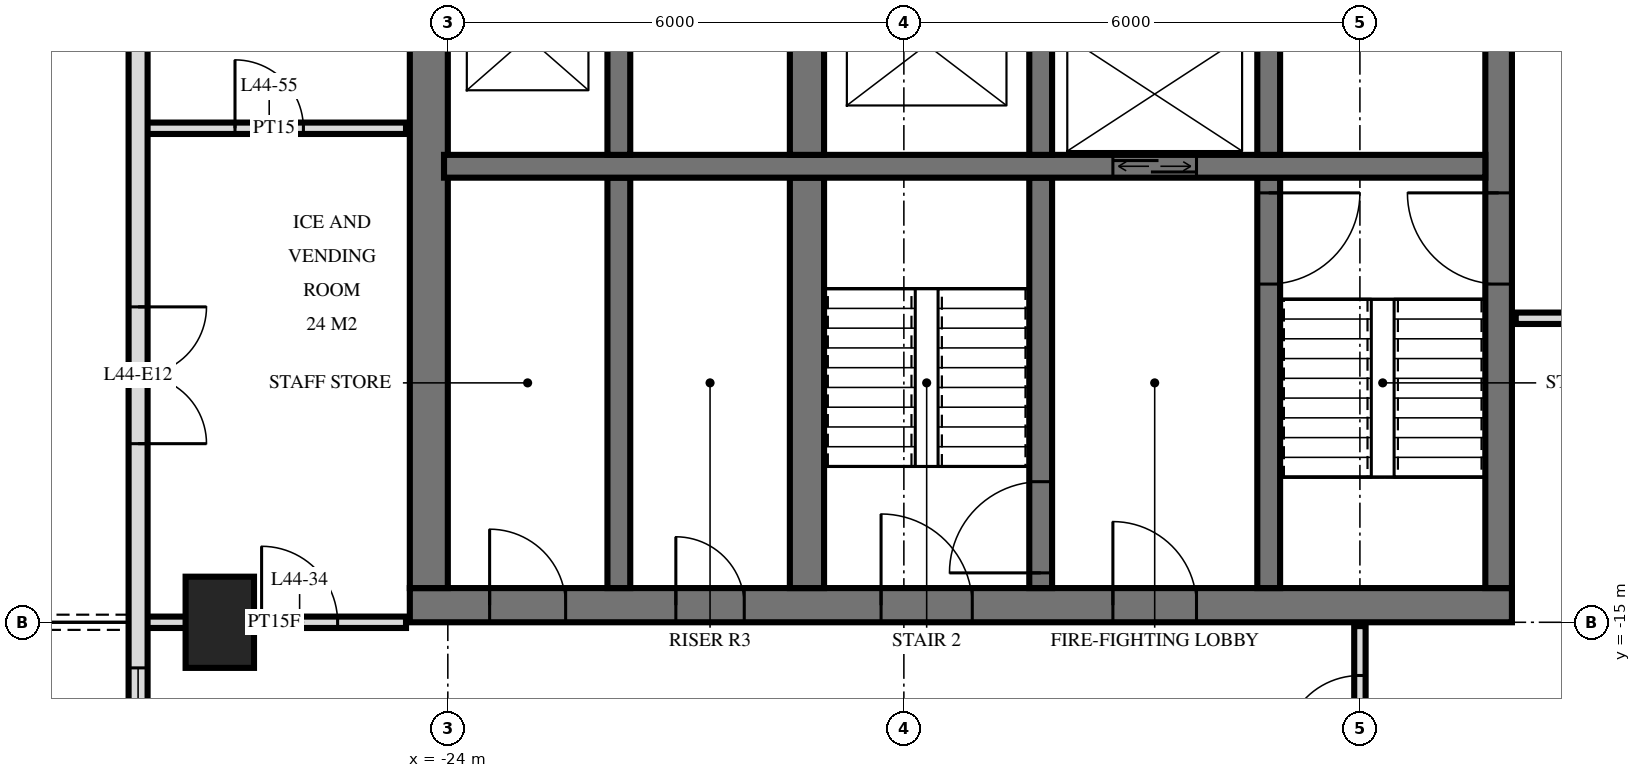
"""IFC4 building model, lengths in metres.
Left out: names, types, materials, properties, quantities, classifications, styles, units other than length and angle.
Written with IfcOpenShell. Run it as: python <this file> out.ifc"""

import sys

from ifc_helpers import new_model, si_unit, direction, frame, frame_2d, origin, origin_2d, place, context, subcontext, project, spatial, rectangle, extrude, element, fill, save


model = new_model("IFC4")
c1 = context("Model", 3, precision=1e-05, world=origin(), true_north=direction((0.0, 1.0)))
c2 = subcontext(c1, "Body", "Model", "MODEL_VIEW")
j1 = project(units=[si_unit("LENGTHUNIT", "METRE"), si_unit("PLANEANGLEUNIT", "RADIAN")], contexts=[c1])
p1 = place(None, origin())
s1 = spatial("IfcSite", under=j1, at=p1, CompositionType="ELEMENT")
p2 = place(p1, origin())
s2 = spatial("IfcBuilding", under=s1, at=p2, CompositionType="ELEMENT")
p3 = place(p2, frame((0.0, 0.0, 170.4)))
s3 = spatial("IfcBuildingStorey", under=s2, at=p3, CompositionType="ELEMENT", Elevation=170.4)
p4 = place(p3, frame((-27.0, -15.0, 0.0), z_axis=(0.0, 0.0, 1.0), x_axis=(0.0, 1.0, 0.0)))
e1 = element("IfcColumn", 1, at=p4, inside=s3, PredefinedType="COLUMN", context=c2, shape_type="SweptSolid", body=[
    extrude(rectangle(XDim=1.2, YDim=0.9, at=origin_2d()), origin(), (0.0, 0.0, 1.0), 3.6),
])
p5 = place(p3, frame((-24.5, -14.775, 0.0), z_axis=(0.0, 0.0, 1.0), x_axis=(1.0, 0.0, 0.0)))
e2 = element("IfcWall", 2, at=p5, inside=s3, PredefinedType="SHEAR", context=c2, shape_type="SweptSolid", body=[
    extrude(rectangle(XDim=14.5, YDim=0.45, at=frame_2d((7.25, 0.0))), origin(), (0.0, 0.0, 1.0), 3.6),
])
p6 = place(p5, frame((6.2, 0.0, 0.0)))
e3 = element("IfcOpeningElement", 3, at=p6, cuts=e2, PredefinedType="OPENING", context=c2, shape_type="SweptSolid", body=[
    extrude(rectangle(XDim=1.2, YDim=2.1, at=frame_2d((0.6, 1.05))), frame((0.0, 0.235, 0.0), z_axis=(0.0, -1.0, 0.0), x_axis=(1.0, 0.0, 0.0)), (0.0, 0.0, 1.0), 0.47),
])
p7 = place(p5, frame((9.25, 0.0, 0.0)))
e4 = element("IfcOpeningElement", 4, at=p7, cuts=e2, PredefinedType="OPENING", context=c2, shape_type="SweptSolid", body=[
    extrude(rectangle(XDim=1.1, YDim=2.1, at=frame_2d((0.55, 1.05))), frame((0.0, 0.235, 0.0), z_axis=(0.0, -1.0, 0.0), x_axis=(1.0, 0.0, 0.0)), (0.0, 0.0, 1.0), 0.47),
])
p8 = place(p5, frame((3.5, 0.0, 0.0)))
e5 = element("IfcOpeningElement", 5, at=p8, cuts=e2, PredefinedType="OPENING", context=c2, shape_type="SweptSolid", body=[
    extrude(rectangle(XDim=0.9, YDim=2.1, at=frame_2d((0.45, 1.05))), frame((0.0, 0.235, 0.0), z_axis=(0.0, -1.0, 0.0), x_axis=(1.0, 0.0, 0.0)), (0.0, 0.0, 1.0), 0.47),
])
p9 = place(p5, frame((1.05, 0.0, 0.0)))
e6 = element("IfcOpeningElement", 6, at=p9, cuts=e2, PredefinedType="OPENING", context=c2, shape_type="SweptSolid", body=[
    extrude(rectangle(XDim=1.0, YDim=2.1, at=frame_2d((0.5, 1.05))), frame((0.0, 0.235, 0.0), z_axis=(0.0, -1.0, 0.0), x_axis=(1.0, 0.0, 0.0)), (0.0, 0.0, 1.0), 0.47),
])
p10 = place(p3, frame((-10.175, -14.55, 0.0), z_axis=(0.0, 0.0, 1.0), x_axis=(0.0, 1.0, 0.0)))
e7 = element("IfcWall", 7, at=p10, inside=s3, PredefinedType="SHEAR", context=c2, shape_type="SweptSolid", body=[
    extrude(rectangle(XDim=14.1, YDim=0.35, at=frame_2d((7.05, 0.0))), origin(), (0.0, 0.0, 1.0), 3.6),
])
p11 = place(p10, frame((8.4, 0.0, 0.0)))
e8 = element("IfcOpeningElement", 8, at=p11, cuts=e7, PredefinedType="OPENING", context=c2, shape_type="SweptSolid", body=[
    extrude(rectangle(XDim=1.4, YDim=2.4, at=frame_2d((0.7, 1.2))), frame((0.0, 0.185, 0.0), z_axis=(0.0, -1.0, 0.0), x_axis=(1.0, 0.0, 0.0)), (0.0, 0.0, 1.0), 0.37),
])
p12 = place(p10, frame((10.0, 0.0, 0.0)))
e9 = element("IfcOpeningElement", 9, at=p12, cuts=e7, PredefinedType="OPENING", context=c2, shape_type="SweptSolid", body=[
    extrude(rectangle(XDim=1.4, YDim=2.4, at=frame_2d((0.7, 1.2))), frame((0.0, 0.185, 0.0), z_axis=(0.0, -1.0, 0.0), x_axis=(1.0, 0.0, 0.0)), (0.0, 0.0, 1.0), 0.37),
])
p13 = place(p10, frame((4.0, 0.0, 0.0)))
e10 = element("IfcOpeningElement", 10, at=p13, cuts=e7, PredefinedType="OPENING", context=c2, shape_type="SweptSolid", body=[
    extrude(rectangle(XDim=1.2, YDim=2.1, at=frame_2d((0.6, 1.05))), frame((0.0, 0.185, 0.0), z_axis=(0.0, -1.0, 0.0), x_axis=(1.0, 0.0, 0.0)), (0.0, 0.0, 1.0), 0.37),
])
p14 = place(p3, frame((-24.25, -14.55, 0.0), z_axis=(0.0, 0.0, 1.0), x_axis=(0.0, 1.0, 0.0)))
e11 = element("IfcWall", 11, at=p14, inside=s3, PredefinedType="SHEAR", context=c2, shape_type="SweptSolid", body=[
    extrude(rectangle(XDim=14.1, YDim=0.5, at=frame_2d((7.05, 0.0))), origin(), (0.0, 0.0, 1.0), 3.6),
])
p15 = place(p3, frame((-24.05, -9.0, 0.0), z_axis=(0.0, 0.0, 1.0), x_axis=(1.0, 0.0, 0.0)))
e12 = element("IfcWall", 12, at=p15, inside=s3, PredefinedType="SHEAR", context=c2, shape_type="SweptSolid", body=[
    extrude(rectangle(XDim=13.7, YDim=0.3, at=frame_2d((6.85, 0.0))), origin(), (0.0, 0.0, 1.0), 3.6),
])
p16 = place(p15, frame((8.8, 0.0, 0.0)))
e13 = element("IfcOpeningElement", 13, at=p16, cuts=e12, PredefinedType="OPENING", context=c2, shape_type="SweptSolid", body=[
    extrude(rectangle(XDim=1.1, YDim=2.1, at=frame_2d((0.55, 1.05))), frame((0.0, 0.16, 0.0), z_axis=(0.0, -1.0, 0.0), x_axis=(1.0, 0.0, 0.0)), (0.0, 0.0, 1.0), 0.32),
])
p17 = place(p3, frame((-13.2, -8.85, 0.0), z_axis=(0.0, 0.0, 1.0), x_axis=(0.0, 1.0, 0.0)))
e14 = element("IfcWall", 14, at=p17, inside=s3, PredefinedType="SHEAR", context=c2, shape_type="SweptSolid", body=[
    extrude(rectangle(XDim=2.3, YDim=0.3, at=frame_2d((1.15, 0.0))), origin(), (0.0, 0.0, 1.0), 3.6),
])
p18 = place(p3, frame((-13.2, -14.55, 0.0), z_axis=(0.0, 0.0, 1.0), x_axis=(0.0, 1.0, 0.0)))
e15 = element("IfcWall", 15, at=p18, inside=s3, PredefinedType="SHEAR", context=c2, shape_type="SweptSolid", body=[
    extrude(rectangle(XDim=5.4, YDim=0.3, at=frame_2d((2.7, 0.0))), origin(), (0.0, 0.0, 1.0), 3.6),
])
p19 = place(p18, frame((4.0, 0.0, 0.0)))
e16 = element("IfcOpeningElement", 16, at=p19, cuts=e15, PredefinedType="OPENING", context=c2, shape_type="SweptSolid", body=[
    extrude(rectangle(XDim=1.2, YDim=2.1, at=frame_2d((0.6, 1.05))), frame((0.0, 0.16, 0.0), z_axis=(0.0, -1.0, 0.0), x_axis=(1.0, 0.0, 0.0)), (0.0, 0.0, 1.0), 0.32),
])
p20 = place(p3, frame((-16.2, -8.85, 0.0), z_axis=(0.0, 0.0, 1.0), x_axis=(0.0, 1.0, 0.0)))
e17 = element("IfcWall", 17, at=p20, inside=s3, PredefinedType="SHEAR", context=c2, shape_type="SweptSolid", body=[
    extrude(rectangle(XDim=2.3, YDim=0.3, at=frame_2d((1.15, 0.0))), origin(), (0.0, 0.0, 1.0), 3.6),
])
p21 = place(p3, frame((-16.2, -14.55, 0.0), z_axis=(0.0, 0.0, 1.0), x_axis=(0.0, 1.0, 0.0)))
e18 = element("IfcWall", 18, at=p21, inside=s3, PredefinedType="SHEAR", context=c2, shape_type="SweptSolid", body=[
    extrude(rectangle(XDim=5.4, YDim=0.3, at=frame_2d((2.7, 0.0))), origin(), (0.0, 0.0, 1.0), 3.6),
])
p22 = place(p21, frame((0.2, 0.0, 0.0)))
e19 = element("IfcOpeningElement", 19, at=p22, cuts=e18, PredefinedType="OPENING", context=c2, shape_type="SweptSolid", body=[
    extrude(rectangle(XDim=1.2, YDim=2.1, at=frame_2d((0.6, 1.05))), frame((0.0, 0.16, 0.0), z_axis=(0.0, -1.0, 0.0), x_axis=(1.0, 0.0, 0.0)), (0.0, 0.0, 1.0), 0.32),
])
p23 = place(p3, frame((-19.275, -8.85, 0.0), z_axis=(0.0, 0.0, 1.0), x_axis=(0.0, 1.0, 0.0)))
e20 = element("IfcWall", 20, at=p23, inside=s3, PredefinedType="SHEAR", context=c2, shape_type="SweptSolid", body=[
    extrude(rectangle(XDim=2.3, YDim=0.45, at=frame_2d((1.15, 0.0))), origin(), (0.0, 0.0, 1.0), 3.6),
])
p24 = place(p3, frame((-19.275, -14.55, 0.0), z_axis=(0.0, 0.0, 1.0), x_axis=(0.0, 1.0, 0.0)))
e21 = element("IfcWall", 21, at=p24, inside=s3, PredefinedType="SHEAR", context=c2, shape_type="SweptSolid", body=[
    extrude(rectangle(XDim=5.4, YDim=0.45, at=frame_2d((2.7, 0.0))), origin(), (0.0, 0.0, 1.0), 3.6),
])
p25 = place(p3, frame((-21.75, -8.85, 0.0), z_axis=(0.0, 0.0, 1.0), x_axis=(0.0, 1.0, 0.0)))
e22 = element("IfcWall", 22, at=p25, inside=s3, PredefinedType="SHEAR", context=c2, shape_type="SweptSolid", body=[
    extrude(rectangle(XDim=2.3, YDim=0.3, at=frame_2d((1.15, 0.0))), origin(), (0.0, 0.0, 1.0), 3.6),
])
p26 = place(p3, frame((-21.75, -14.55, 0.0), z_axis=(0.0, 0.0, 1.0), x_axis=(0.0, 1.0, 0.0)))
e23 = element("IfcWall", 23, at=p26, inside=s3, PredefinedType="SHEAR", context=c2, shape_type="SweptSolid", body=[
    extrude(rectangle(XDim=5.4, YDim=0.3, at=frame_2d((2.7, 0.0))), origin(), (0.0, 0.0, 1.0), 3.6),
])
p27 = place(p3, frame((-28.075, -3.325, 0.0), z_axis=(0.0, 0.0, 1.0), x_axis=(0.0, -1.0, 0.0)))
e24 = element("IfcWall", 24, at=p27, inside=s3, PredefinedType="SOLIDWALL", context=c2, shape_type="SweptSolid", body=[
    extrude(rectangle(XDim=25.951, YDim=0.25, at=frame_2d((12.975, 0.0))), origin(), (0.0, 0.0, 1.0), 3.32),
])
p28 = place(p27, frame((7.525, 0.0, 0.0)))
e25 = element("IfcOpeningElement", 25, at=p28, cuts=e24, PredefinedType="OPENING", context=c2, shape_type="SweptSolid", body=[
    extrude(rectangle(XDim=1.8, YDim=2.4, at=frame_2d((0.9, 1.2))), frame((0.0, 0.135, 0.0), z_axis=(0.0, -1.0, 0.0), x_axis=(1.0, 0.0, 0.0)), (0.0, 0.0, 1.0), 0.27),
])
p29 = place(p27, frame((12.275, 0.0, 0.3)))
e26 = element("IfcOpeningElement", 26, at=p29, cuts=e24, PredefinedType="OPENING", context=c2, shape_type="SweptSolid", body=[
    extrude(rectangle(XDim=1.2, YDim=2.1, at=frame_2d((0.6, 1.05))), frame((0.0, 0.135, 0.0), z_axis=(0.0, -1.0, 0.0), x_axis=(1.0, 0.0, 0.0)), (0.0, 0.0, 1.0), 0.27),
])
p30 = place(p27, frame((14.975, 0.0, 0.3)))
e27 = element("IfcOpeningElement", 27, at=p30, cuts=e24, PredefinedType="OPENING", context=c2, shape_type="SweptSolid", body=[
    extrude(rectangle(XDim=2.4, YDim=2.1, at=frame_2d((1.2, 1.05))), frame((0.0, 0.135, 0.0), z_axis=(0.0, -1.0, 0.0), x_axis=(1.0, 0.0, 0.0)), (0.0, 0.0, 1.0), 0.27),
])
p31 = place(p27, frame((18.175, 0.0, 0.0)))
e28 = element("IfcOpeningElement", 28, at=p31, cuts=e24, PredefinedType="OPENING", context=c2, shape_type="SweptSolid", body=[
    extrude(rectangle(XDim=1.8, YDim=2.4, at=frame_2d((0.9, 1.2))), frame((0.0, 0.135, 0.0), z_axis=(0.0, -1.0, 0.0), x_axis=(1.0, 0.0, 0.0)), (0.0, 0.0, 1.0), 0.27),
])
p32 = place(p27, frame((21.075, 0.0, 0.0)))
e29 = element("IfcOpeningElement", 29, at=p32, cuts=e24, PredefinedType="OPENING", context=c2, shape_type="SweptSolid", body=[
    extrude(rectangle(XDim=1.8, YDim=2.4, at=frame_2d((0.9, 1.2))), frame((0.0, 0.135, 0.0), z_axis=(0.0, -1.0, 0.0), x_axis=(1.0, 0.0, 0.0)), (0.0, 0.0, 1.0), 0.27),
])
p33 = place(p27, frame((23.825, 0.0, 0.3)))
e30 = element("IfcOpeningElement", 30, at=p33, cuts=e24, PredefinedType="OPENING", context=c2, shape_type="SweptSolid", body=[
    extrude(rectangle(XDim=1.8, YDim=2.1, at=frame_2d((0.9, 1.05))), frame((0.0, 0.135, 0.0), z_axis=(0.0, -1.0, 0.0), x_axis=(1.0, 0.0, 0.0)), (0.0, 0.0, 1.0), 0.27),
])
p34 = place(p3, frame((-12.0, -17.4, 0.0), z_axis=(0.0, 0.0, 1.0), x_axis=(0.0, 1.0, 0.0)))
e31 = element("IfcWall", 31, at=p34, inside=s3, PredefinedType="PARTITIONING", context=c2, shape_type="SweptSolid", body=[
    extrude(rectangle(XDim=2.35, YDim=0.15, at=frame_2d((1.175, 0.0))), origin(), (0.0, 0.0, 1.0), 3.32),
])
p35 = place(p34, frame((0.7, 0.0, 0.0)))
e32 = element("IfcOpeningElement", 32, at=p35, cuts=e31, PredefinedType="OPENING", context=c2, shape_type="SweptSolid", body=[
    extrude(rectangle(XDim=1.0, YDim=2.1, at=frame_2d((0.5, 1.05))), frame((0.0, 0.085, 0.0), z_axis=(0.0, -1.0, 0.0), x_axis=(1.0, 0.0, 0.0)), (0.0, 0.0, 1.0), 0.17),
])
p36 = place(p3, frame((-28.02, -15.0, 0.0), z_axis=(0.0, 0.0, 1.0), x_axis=(1.0, 0.0, 0.0)))
e33 = element("IfcWall", 33, at=p36, inside=s3, PredefinedType="PARTITIONING", context=c2, shape_type="SweptSolid", body=[
    extrude(rectangle(XDim=3.47, YDim=0.15, at=frame_2d((1.735, 0.0))), origin(), (0.0, 0.0, 1.0), 3.32),
])
p37 = place(p36, frame((1.57, 0.0, 0.0)))
e34 = element("IfcOpeningElement", 34, at=p37, cuts=e33, PredefinedType="OPENING", context=c2, shape_type="SweptSolid", body=[
    extrude(rectangle(XDim=1.0, YDim=2.1, at=frame_2d((0.5, 1.05))), frame((0.0, 0.085, 0.0), z_axis=(0.0, -1.0, 0.0), x_axis=(1.0, 0.0, 0.0)), (0.0, 0.0, 1.0), 0.17),
])
p38 = place(p3, frame((-9.95, -11.0, 0.0), z_axis=(0.0, 0.0, 1.0), x_axis=(1.0, 0.0, 0.0)))
e35 = element("IfcWall", 35, at=p38, inside=s3, PredefinedType="PARTITIONING", context=c2, shape_type="SweptSolid", body=[
    extrude(rectangle(XDim=19.9, YDim=0.15, at=frame_2d((9.95, 0.0))), origin(), (0.0, 0.0, 1.0), 3.32),
])
p39 = place(p38, frame((9.45, 0.0, 0.0)))
e36 = element("IfcOpeningElement", 36, at=p39, cuts=e35, PredefinedType="OPENING", context=c2, shape_type="SweptSolid", body=[
    extrude(rectangle(XDim=1.0, YDim=2.1, at=frame_2d((0.5, 1.05))), frame((0.0, 0.085, 0.0), z_axis=(0.0, -1.0, 0.0), x_axis=(1.0, 0.0, 0.0)), (0.0, 0.0, 1.0), 0.17),
])
p40 = place(p38, frame((3.45, 0.0, 0.0)))
e37 = element("IfcOpeningElement", 37, at=p40, cuts=e35, PredefinedType="OPENING", context=c2, shape_type="SweptSolid", body=[
    extrude(rectangle(XDim=1.0, YDim=2.1, at=frame_2d((0.5, 1.05))), frame((0.0, 0.085, 0.0), z_axis=(0.0, -1.0, 0.0), x_axis=(1.0, 0.0, 0.0)), (0.0, 0.0, 1.0), 0.17),
])
p41 = place(p3, frame((-28.02, -8.5, 0.0), z_axis=(0.0, 0.0, 1.0), x_axis=(1.0, 0.0, 0.0)))
e38 = element("IfcWall", 38, at=p41, inside=s3, PredefinedType="PARTITIONING", context=c2, shape_type="SweptSolid", body=[
    extrude(rectangle(XDim=3.47, YDim=0.15, at=frame_2d((1.735, 0.0))), origin(), (0.0, 0.0, 1.0), 3.32),
])
p42 = place(p41, frame((1.22, 0.0, 0.0)))
e39 = element("IfcOpeningElement", 39, at=p42, cuts=e38, PredefinedType="OPENING", context=c2, shape_type="SweptSolid", body=[
    extrude(rectangle(XDim=0.9, YDim=2.1, at=frame_2d((0.45, 1.05))), frame((0.0, 0.085, 0.0), z_axis=(0.0, -1.0, 0.0), x_axis=(1.0, 0.0, 0.0)), (0.0, 0.0, 1.0), 0.17),
])
p43 = place(p28, origin())
e40 = element("IfcDoor", 40, at=p43, inside=s3, OperationType="DOUBLE_DOOR_SINGLE_SWING", PredefinedType="DOOR", context=c2, shape_type="SweptSolid", body=[
    extrude(rectangle(XDim=1.8, YDim=2.4, at=frame_2d((0.9, 1.2))), frame((0.0, 0.025, 0.0), z_axis=(0.0, -1.0, 0.0), x_axis=(1.0, 0.0, 0.0)), (0.0, 0.0, 1.0), 0.05),
])
fill(e25, e40)
p44 = place(p29, origin())
e41 = element("IfcWindow", 41, at=p44, inside=s3, PartitioningType="SINGLE_PANEL", PredefinedType="WINDOW", context=c2, shape_type="SweptSolid", body=[
    extrude(rectangle(XDim=1.2, YDim=2.1, at=frame_2d((0.6, 1.05))), frame((0.0, 0.03, 0.0), z_axis=(0.0, -1.0, 0.0), x_axis=(1.0, 0.0, 0.0)), (0.0, 0.0, 1.0), 0.06),
])
fill(e26, e41)
p45 = place(p16, origin())
e42 = element("IfcDoor", 42, at=p45, inside=s3, OperationType="DOUBLE_DOOR_SLIDING", PredefinedType="USERDEFINED", context=c2, shape_type="SweptSolid", body=[
    extrude(rectangle(XDim=1.1, YDim=2.1, at=frame_2d((0.55, 1.05))), frame((0.0, 0.025, 0.0), z_axis=(0.0, -1.0, 0.0), x_axis=(1.0, 0.0, 0.0)), (0.0, 0.0, 1.0), 0.05),
])
fill(e13, e42)
p46 = place(p13, origin())
e43 = element("IfcDoor", 43, at=p46, inside=s3, OperationType="SINGLE_SWING_LEFT", PredefinedType="DOOR", context=c2, shape_type="SweptSolid", body=[
    extrude(rectangle(XDim=1.2, YDim=2.1, at=frame_2d((0.6, 1.05))), frame((0.0, 0.025, 0.0), z_axis=(0.0, -1.0, 0.0), x_axis=(1.0, 0.0, 0.0)), (0.0, 0.0, 1.0), 0.05),
])
fill(e10, e43)
p47 = place(p6, origin())
e44 = element("IfcDoor", 44, at=p47, inside=s3, OperationType="SINGLE_SWING_RIGHT", PredefinedType="DOOR", context=c2, shape_type="SweptSolid", body=[
    extrude(rectangle(XDim=1.2, YDim=2.1, at=frame_2d((0.6, 1.05))), frame((0.0, 0.025, 0.0), z_axis=(0.0, -1.0, 0.0), x_axis=(1.0, 0.0, 0.0)), (0.0, 0.0, 1.0), 0.05),
])
fill(e3, e44)
p48 = place(p7, origin())
e45 = element("IfcDoor", 45, at=p48, inside=s3, OperationType="SINGLE_SWING_RIGHT", PredefinedType="DOOR", context=c2, shape_type="SweptSolid", body=[
    extrude(rectangle(XDim=1.1, YDim=2.1, at=frame_2d((0.55, 1.05))), frame((0.0, 0.025, 0.0), z_axis=(0.0, -1.0, 0.0), x_axis=(1.0, 0.0, 0.0)), (0.0, 0.0, 1.0), 0.05),
])
fill(e4, e45)
p49 = place(p8, origin())
e46 = element("IfcDoor", 46, at=p49, inside=s3, OperationType="SINGLE_SWING_RIGHT", PredefinedType="DOOR", context=c2, shape_type="SweptSolid", body=[
    extrude(rectangle(XDim=0.9, YDim=2.1, at=frame_2d((0.45, 1.05))), frame((0.0, 0.025, 0.0), z_axis=(0.0, -1.0, 0.0), x_axis=(1.0, 0.0, 0.0)), (0.0, 0.0, 1.0), 0.05),
])
fill(e5, e46)
p50 = place(p9, origin())
e47 = element("IfcDoor", 47, at=p50, inside=s3, OperationType="SINGLE_SWING_RIGHT", PredefinedType="DOOR", context=c2, shape_type="SweptSolid", body=[
    extrude(rectangle(XDim=1.0, YDim=2.1, at=frame_2d((0.5, 1.05))), frame((0.0, 0.025, 0.0), z_axis=(0.0, -1.0, 0.0), x_axis=(1.0, 0.0, 0.0)), (0.0, 0.0, 1.0), 0.05),
])
fill(e6, e47)
p51 = place(p19, frame((0.6, 0.0, 0.0), z_axis=(0.0, 0.0, 1.0), x_axis=(-1.0, 0.0, 0.0)))
e48 = element("IfcDoor", 48, at=p51, inside=s3, OperationType="SINGLE_SWING_RIGHT", PredefinedType="DOOR", context=c2, shape_type="SweptSolid", body=[
    extrude(rectangle(XDim=1.2, YDim=2.1, at=frame_2d((0.0, 1.05))), frame((0.0, -0.025, 0.0), z_axis=(0.0, 1.0, 0.0), x_axis=(-1.0, 0.0, 0.0)), (0.0, 0.0, 1.0), 0.05),
])
fill(e16, e48)
p52 = place(p22, origin())
e49 = element("IfcDoor", 49, at=p52, inside=s3, OperationType="SINGLE_SWING_RIGHT", PredefinedType="DOOR", context=c2, shape_type="SweptSolid", body=[
    extrude(rectangle(XDim=1.2, YDim=2.1, at=frame_2d((0.6, 1.05))), frame((0.0, 0.025, 0.0), z_axis=(0.0, -1.0, 0.0), x_axis=(1.0, 0.0, 0.0)), (0.0, 0.0, 1.0), 0.05),
])
fill(e19, e49)
p53 = place(p35, origin())
e50 = element("IfcDoor", 50, at=p53, inside=s3, OperationType="SINGLE_SWING_RIGHT", PredefinedType="DOOR", context=c2, shape_type="SweptSolid", body=[
    extrude(rectangle(XDim=1.0, YDim=2.1, at=frame_2d((0.5, 1.05))), frame((0.0, 0.025, 0.0), z_axis=(0.0, -1.0, 0.0), x_axis=(1.0, 0.0, 0.0)), (0.0, 0.0, 1.0), 0.05),
])
fill(e32, e50)
p54 = place(p37, origin())
e51 = element("IfcDoor", 51, at=p54, inside=s3, OperationType="SINGLE_SWING_RIGHT", PredefinedType="DOOR", context=c2, shape_type="SweptSolid", body=[
    extrude(rectangle(XDim=1.0, YDim=2.1, at=frame_2d((0.5, 1.05))), frame((0.0, 0.025, 0.0), z_axis=(0.0, -1.0, 0.0), x_axis=(1.0, 0.0, 0.0)), (0.0, 0.0, 1.0), 0.05),
])
fill(e34, e51)
p55 = place(p42, origin())
e52 = element("IfcDoor", 52, at=p55, inside=s3, OperationType="SINGLE_SWING_RIGHT", PredefinedType="DOOR", context=c2, shape_type="SweptSolid", body=[
    extrude(rectangle(XDim=0.9, YDim=2.1, at=frame_2d((0.45, 1.05))), frame((0.0, 0.025, 0.0), z_axis=(0.0, -1.0, 0.0), x_axis=(1.0, 0.0, 0.0)), (0.0, 0.0, 1.0), 0.05),
])
fill(e39, e52)
save(model, sys.argv[1])
